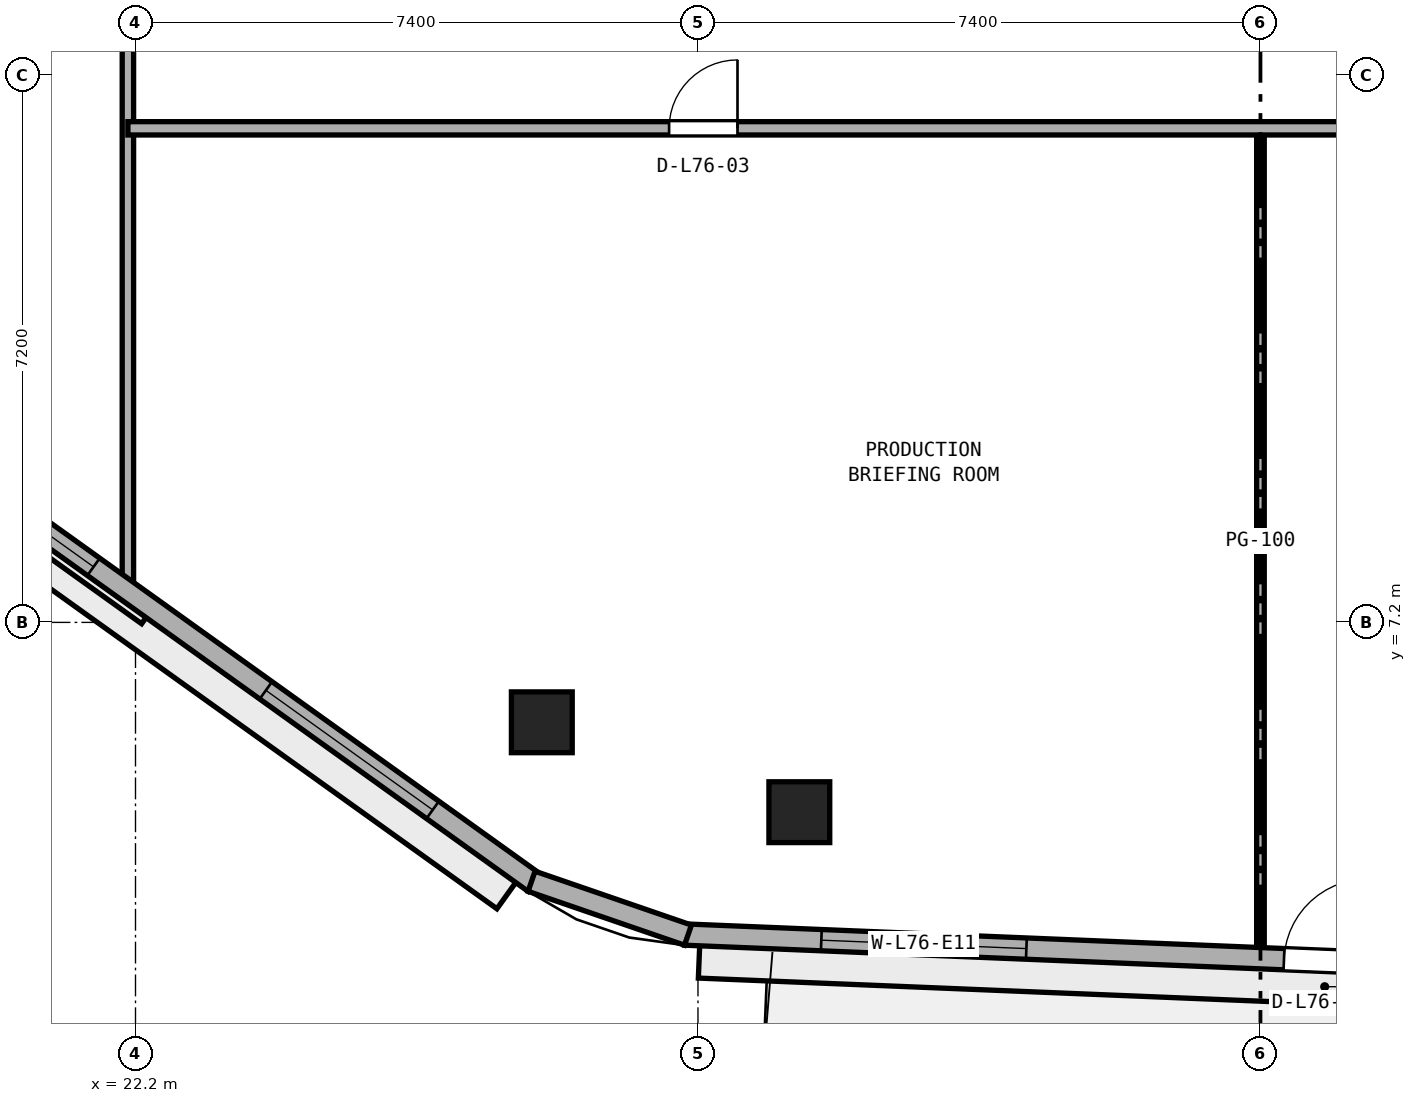
"""IFC4 building model, lengths in metres.
Left out: names, types, materials, properties, quantities, classifications, styles, units other than length and angle.
Written with IfcOpenShell. Run it as: python <this file> out.ifc"""

import sys

from ifc_helpers import new_model, si_unit, direction, frame, frame_2d, origin, origin_2d, place, context, subcontext, project, spatial, rectangle, extrude, element, fill, save


model = new_model("IFC4")
c1 = context("Model", 3, precision=1e-05, world=origin(), true_north=direction((0.0, 1.0)))
c2 = subcontext(c1, "Body", "Model", "MODEL_VIEW")
j1 = project(units=[si_unit("LENGTHUNIT", "METRE"), si_unit("PLANEANGLEUNIT", "RADIAN")], contexts=[c1])
p1 = place(None, origin())
s1 = spatial("IfcSite", under=j1, at=p1, CompositionType="ELEMENT")
p2 = place(p1, origin())
s2 = spatial("IfcBuilding", under=s1, at=p2, CompositionType="ELEMENT")
p3 = place(p2, frame((0.0, 0.0, 297.2)))
s3 = spatial("IfcBuildingStorey", under=s2, at=p3, CompositionType="ELEMENT", Elevation=297.2)
for number, where, z_axis, x_axis in (
    (1, (30.934, 4.703, 0.0), (0.0, 0.0, 1.0), (1.0, 0.0, 0.0)),
    (2, (27.545, 5.886, 0.0), (0.0, 0.0, 1.0), (1.0, 0.0, 0.0)),
):
    element("IfcColumn", number, at=place(p3, frame(where, z_axis=z_axis, x_axis=x_axis)), inside=s3, PredefinedType="COLUMN", context=c2, shape_type="SweptSolid", body=[
        extrude(rectangle(XDim=0.8, YDim=0.8, at=origin_2d()), origin(), (0.0, 0.0, 1.0), 3.8),
    ])
p4 = place(p3, frame((37.0, 2.847, 0.0), z_axis=(0.0, 0.0, 1.0), x_axis=(0.0, 1.0, 0.0)))
e3 = element("IfcWall", 3, at=p4, inside=s3, PredefinedType="PARTITIONING", context=c2, shape_type="SweptSolid", body=[
    extrude(rectangle(XDim=10.853, YDim=0.1, at=frame_2d((5.427, 0.0))), origin(), (0.0, 0.0, 1.0), 3.54),
])
p5 = place(p3, frame((22.1, 7.575, 0.0), z_axis=(0.0, 0.0, 1.0), x_axis=(0.0, 1.0, 0.0)))
e4 = element("IfcWall", 4, at=p5, inside=s3, PredefinedType="PARTITIONING", context=c2, shape_type="SweptSolid", body=[
    extrude(rectangle(XDim=29.125, YDim=0.15, at=frame_2d((14.562, 0.0))), origin(), (0.0, 0.0, 1.0), 3.54),
])
p6 = place(p5, frame((9.925, 0.0, 0.0)))
e5 = element("IfcOpeningElement", 5, at=p6, cuts=e4, PredefinedType="OPENING", context=c2, shape_type="SweptSolid", body=[
    extrude(rectangle(XDim=0.9, YDim=2.1, at=frame_2d((0.45, 1.05))), frame((0.0, 0.085, 0.0), z_axis=(0.0, -1.0, 0.0), x_axis=(1.0, 0.0, 0.0)), (0.0, 0.0, 1.0), 0.17),
])
p7 = place(p5, frame((19.75, 0.0, 0.0)))
e6 = element("IfcOpeningElement", 6, at=p7, cuts=e4, PredefinedType="OPENING", context=c2, shape_type="SweptSolid", body=[
    extrude(rectangle(XDim=0.9, YDim=2.1, at=frame_2d((0.45, 1.05))), frame((0.0, 0.085, 0.0), z_axis=(0.0, -1.0, 0.0), x_axis=(1.0, 0.0, 0.0)), (0.0, 0.0, 1.0), 0.17),
])
p8 = place(p3, frame((22.1, 13.7, 0.0), z_axis=(0.0, 0.0, 1.0), x_axis=(1.0, 0.0, 0.0)))
e7 = element("IfcWall", 7, at=p8, inside=s3, PredefinedType="PARTITIONING", context=c2, shape_type="SweptSolid", body=[
    extrude(rectangle(XDim=26.5, YDim=0.175, at=frame_2d((13.25, 0.0))), origin(), (0.0, 0.0, 1.0), 3.54),
])
p9 = place(p8, frame((7.12, 0.0, 0.0)))
e8 = element("IfcOpeningElement", 8, at=p9, cuts=e7, PredefinedType="OPENING", context=c2, shape_type="SweptSolid", body=[
    extrude(rectangle(XDim=0.9, YDim=2.1, at=frame_2d((0.45, 1.05))), frame((0.0, 0.097, 0.0), z_axis=(0.0, -1.0, 0.0), x_axis=(1.0, 0.0, 0.0)), (0.0, 0.0, 1.0), 0.195),
])
p10 = place(p8, frame((20.13, 0.0, 0.0)))
e9 = element("IfcOpeningElement", 9, at=p10, cuts=e7, PredefinedType="OPENING", context=c2, shape_type="SweptSolid", body=[
    extrude(rectangle(XDim=0.9, YDim=2.1, at=frame_2d((0.45, 1.05))), frame((0.0, 0.097, 0.0), z_axis=(0.0, -1.0, 0.0), x_axis=(1.0, 0.0, 0.0)), (0.0, 0.0, 1.0), 0.195),
])
p11 = place(p3, frame((29.428, 3.093, 0.0), z_axis=(0.0, 0.0, 1.0), x_axis=(0.999156257967, -0.041070331944, 0.0)))
e10 = element("IfcWall", 10, at=p11, inside=s3, PredefinedType="STANDARD", context=c2, shape_type="SweptSolid", body=[
    extrude(rectangle(XDim=16.876, YDim=0.28, at=frame_2d((8.438, 0.0))), origin(), (0.0, 0.0, 1.0), 3.54),
])
p12 = place(p11, frame((7.888, 0.0, 0.0)))
e11 = element("IfcOpeningElement", 11, at=p12, cuts=e10, PredefinedType="OPENING", context=c2, shape_type="SweptSolid", body=[
    extrude(rectangle(XDim=1.1, YDim=2.2, at=frame_2d((0.55, 1.1))), frame((0.0, 0.15, 0.0), z_axis=(0.0, -1.0, 0.0), x_axis=(1.0, 0.0, 0.0)), (0.0, 0.0, 1.0), 0.3),
])
p13 = place(p11, frame((1.796, 0.0, 0.9)))
e12 = element("IfcOpeningElement", 12, at=p13, cuts=e10, PredefinedType="OPENING", context=c2, shape_type="SweptSolid", body=[
    extrude(rectangle(XDim=2.7, YDim=1.75, at=frame_2d((1.35, 0.875))), frame((0.0, 0.15, 0.0), z_axis=(0.0, -1.0, 0.0), x_axis=(1.0, 0.0, 0.0)), (0.0, 0.0, 1.0), 0.3),
])
p14 = place(p11, frame((12.38, 0.0, 0.9)))
e13 = element("IfcOpeningElement", 13, at=p14, cuts=e10, PredefinedType="OPENING", context=c2, shape_type="SweptSolid", body=[
    extrude(rectangle(XDim=2.7, YDim=1.75, at=frame_2d((1.35, 0.875))), frame((0.0, 0.15, 0.0), z_axis=(0.0, -1.0, 0.0), x_axis=(1.0, 0.0, 0.0)), (0.0, 0.0, 1.0), 0.3),
])
p15 = place(p3, frame((14.468, 13.077, 0.0), z_axis=(0.0, 0.0, 1.0), x_axis=(0.812809888039, -0.582529042972, 0.0)))
e14 = element("IfcWall", 14, at=p15, inside=s3, PredefinedType="STANDARD", context=c2, shape_type="SweptSolid", body=[
    extrude(rectangle(XDim=15.968, YDim=0.28, at=frame_2d((7.984, 0.0))), origin(), (0.0, 0.0, 1.0), 3.54),
])
p16 = place(p15, frame((1.645, 0.0, 0.9)))
e15 = element("IfcOpeningElement", 15, at=p16, cuts=e14, PredefinedType="OPENING", context=c2, shape_type="SweptSolid", body=[
    extrude(rectangle(XDim=2.7, YDim=1.75, at=frame_2d((1.35, 0.875))), frame((0.0, 0.15, 0.0), z_axis=(0.0, -1.0, 0.0), x_axis=(1.0, 0.0, 0.0)), (0.0, 0.0, 1.0), 0.3),
])
p17 = place(p15, frame((6.134, 0.0, 0.9)))
e16 = element("IfcOpeningElement", 16, at=p17, cuts=e14, PredefinedType="OPENING", context=c2, shape_type="SweptSolid", body=[
    extrude(rectangle(XDim=2.7, YDim=1.75, at=frame_2d((1.35, 0.875))), frame((0.0, 0.15, 0.0), z_axis=(0.0, -1.0, 0.0), x_axis=(1.0, 0.0, 0.0)), (0.0, 0.0, 1.0), 0.3),
])
p18 = place(p15, frame((11.623, 0.0, 0.9)))
e17 = element("IfcOpeningElement", 17, at=p18, cuts=e14, PredefinedType="OPENING", context=c2, shape_type="SweptSolid", body=[
    extrude(rectangle(XDim=2.7, YDim=1.75, at=frame_2d((1.35, 0.875))), frame((0.0, 0.15, 0.0), z_axis=(0.0, -1.0, 0.0), x_axis=(1.0, 0.0, 0.0)), (0.0, 0.0, 1.0), 0.3),
])
p19 = place(p3, frame((27.411, 3.794, 0.0), z_axis=(0.0, 0.0, 1.0), x_axis=(0.945552869008, -0.325468542121, 0.0)))
e18 = element("IfcWall", 18, at=p19, inside=s3, PredefinedType="STANDARD", context=c2, shape_type="SweptSolid", body=[
    extrude(rectangle(XDim=2.176, YDim=0.28, at=frame_2d((1.088, 0.0))), origin(), (0.0, 0.0, 1.0), 3.54),
])
p20 = place(p9, origin())
e19 = element("IfcDoor", 19, at=p20, inside=s3, OperationType="SINGLE_SWING_RIGHT", PredefinedType="DOOR", context=c2, shape_type="SweptSolid", body=[
    extrude(rectangle(XDim=0.9, YDim=2.1, at=frame_2d((0.45, 1.05))), frame((0.0, 0.025, 0.0), z_axis=(0.0, -1.0, 0.0), x_axis=(1.0, 0.0, 0.0)), (0.0, 0.0, 1.0), 0.05),
])
fill(e8, e19)
p21 = place(p12, origin())
e20 = element("IfcDoor", 20, at=p21, inside=s3, OperationType="SINGLE_SWING_RIGHT", PredefinedType="DOOR", context=c2, shape_type="SweptSolid", body=[
    extrude(rectangle(XDim=1.1, YDim=2.2, at=frame_2d((0.55, 1.1))), frame((0.0, 0.025, 0.0), z_axis=(0.0, -1.0, 0.0), x_axis=(1.0, 0.0, 0.0)), (0.0, 0.0, 1.0), 0.05),
])
fill(e11, e20)
p22 = place(p13, origin())
e21 = element("IfcWindow", 21, at=p22, inside=s3, PartitioningType="SINGLE_PANEL", PredefinedType="WINDOW", context=c2, shape_type="SweptSolid", body=[
    extrude(rectangle(XDim=2.7, YDim=1.75, at=frame_2d((1.35, 0.875))), frame((0.0, 0.03, 0.0), z_axis=(0.0, -1.0, 0.0), x_axis=(1.0, 0.0, 0.0)), (0.0, 0.0, 1.0), 0.06),
])
fill(e12, e21)
p23 = place(p17, origin())
e22 = element("IfcWindow", 22, at=p23, inside=s3, PartitioningType="SINGLE_PANEL", PredefinedType="WINDOW", context=c2, shape_type="SweptSolid", body=[
    extrude(rectangle(XDim=2.7, YDim=1.75, at=frame_2d((1.35, 0.875))), frame((0.0, 0.03, 0.0), z_axis=(0.0, -1.0, 0.0), x_axis=(1.0, 0.0, 0.0)), (0.0, 0.0, 1.0), 0.06),
])
fill(e16, e22)
p24 = place(p18, origin())
e23 = element("IfcWindow", 23, at=p24, inside=s3, PartitioningType="SINGLE_PANEL", PredefinedType="WINDOW", context=c2, shape_type="SweptSolid", body=[
    extrude(rectangle(XDim=2.7, YDim=1.75, at=frame_2d((1.35, 0.875))), frame((0.0, 0.03, 0.0), z_axis=(0.0, -1.0, 0.0), x_axis=(1.0, 0.0, 0.0)), (0.0, 0.0, 1.0), 0.06),
])
fill(e17, e23)
save(model, sys.argv[1])
